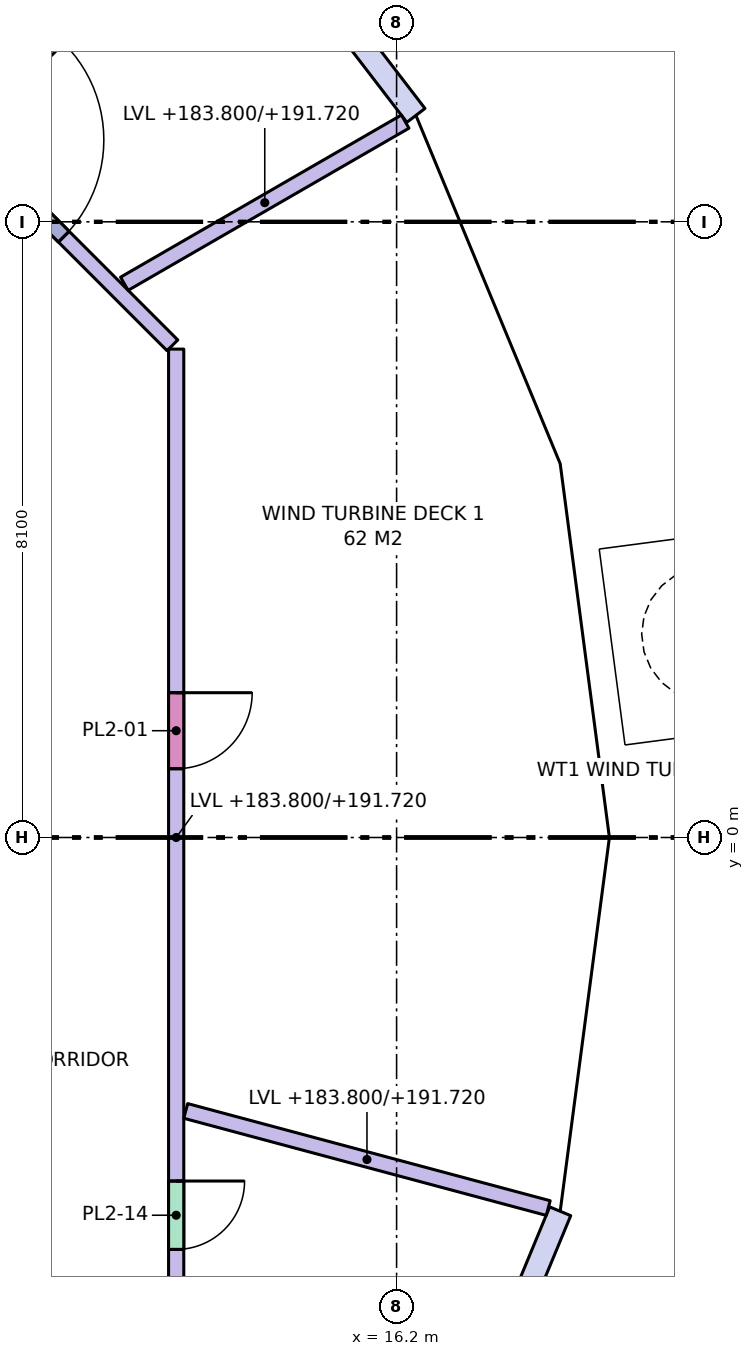
"""IFC4 building model, lengths in metres.
Left out: names, types, materials, properties, quantities, classifications, styles, units other than length and angle.
Written with IfcOpenShell. Run it as: python <this file> out.ifc"""

import sys

from ifc_helpers import new_model, si_unit, direction, frame, frame_2d, origin, place, context, subcontext, project, spatial, rectangle, extrude, element, fill, save


model = new_model("IFC4")
c1 = context("Model", 3, precision=1e-05, world=origin(), true_north=direction((0.0, 1.0)))
c2 = subcontext(c1, "Body", "Model", "MODEL_VIEW")
j1 = project(units=[si_unit("LENGTHUNIT", "METRE"), si_unit("PLANEANGLEUNIT", "RADIAN")], contexts=[c1])
p1 = place(None, origin())
s1 = spatial("IfcSite", under=j1, at=p1, CompositionType="ELEMENT")
p2 = place(p1, origin())
s2 = spatial("IfcBuilding", under=s1, at=p2, CompositionType="ELEMENT")
p3 = place(p2, frame((0.0, 0.0, 183.8)))
s3 = spatial("IfcBuildingStorey", under=s2, at=p3, CompositionType="ELEMENT", Elevation=183.8)
p4 = place(p3, frame((16.455, 9.5, 0.0), z_axis=(0.0, 0.0, 1.0), x_axis=(-0.608786657876, 0.793333980864, 0.0)))
e1 = element("IfcWall", 1, at=p4, inside=s3, PredefinedType="STANDARD", context=c2, shape_type="SweptSolid", body=[
    extrude(rectangle(XDim=4.56, YDim=0.3, at=frame_2d((2.28, 0.0))), origin(), (0.0, 0.0, 1.0), 8.72),
])
p5 = place(p3, frame((16.455, -9.5, 0.0), z_axis=(0.0, 0.0, 1.0), x_axis=(0.382650301762, 0.923893254961, 0.0)))
e2 = element("IfcWall", 2, at=p5, inside=s3, PredefinedType="STANDARD", context=c2, shape_type="SweptSolid", body=[
    extrude(rectangle(XDim=4.96, YDim=0.3, at=frame_2d((2.48, 0.0))), origin(), (0.0, 0.0, 1.0), 8.72),
])
p6 = place(p5, frame((1.98, 0.0, 0.0)))
e3 = element("IfcOpeningElement", 3, at=p6, cuts=e2, PredefinedType="OPENING", context=c2, shape_type="SweptSolid", body=[
    extrude(rectangle(XDim=1.0, YDim=2.4, at=frame_2d((0.5, 1.2))), frame((0.0, 0.16, 0.0), z_axis=(0.0, -1.0, 0.0), x_axis=(1.0, 0.0, 0.0)), (0.0, 0.0, 1.0), 0.32),
])
p7 = place(p3, frame((8.475, 11.25, 0.0), z_axis=(0.0, 0.0, 1.0), x_axis=(0.707106781187, -0.707106781187, 0.0)))
e4 = element("IfcWall", 4, at=p7, inside=s3, PredefinedType="PARTITIONING", context=c2, shape_type="SweptSolid", body=[
    extrude(rectangle(XDim=6.753, YDim=0.2, at=frame_2d((3.377, 0.0))), origin(), (0.0, 0.0, 1.0), 7.92),
])
p8 = place(p7, frame((2.932, 0.0, 0.0)))
e5 = element("IfcOpeningElement", 5, at=p8, cuts=e4, PredefinedType="OPENING", context=c2, shape_type="SweptSolid", body=[
    extrude(rectangle(XDim=1.8, YDim=2.1, at=frame_2d((0.9, 1.05))), frame((0.0, 0.11, 0.0), z_axis=(0.0, -1.0, 0.0), x_axis=(1.0, 0.0, 0.0)), (0.0, 0.0, 1.0), 0.22),
])
p9 = place(p3, frame((13.3, 6.426, 0.0), z_axis=(0.0, 0.0, 1.0), x_axis=(0.0, -1.0, 0.0)))
e6 = element("IfcWall", 6, at=p9, inside=s3, PredefinedType="PARTITIONING", context=c2, shape_type="SweptSolid", body=[
    extrude(rectangle(XDim=12.851, YDim=0.2, at=frame_2d((6.426, 0.0))), origin(), (0.0, 0.0, 1.0), 7.92),
])
p10 = place(p9, frame((4.521, 0.0, 0.0)))
e7 = element("IfcOpeningElement", 7, at=p10, cuts=e6, PredefinedType="OPENING", context=c2, shape_type="SweptSolid", body=[
    extrude(rectangle(XDim=1.0, YDim=2.1, at=frame_2d((0.5, 1.05))), frame((0.0, 0.11, 0.0), z_axis=(0.0, -1.0, 0.0), x_axis=(1.0, 0.0, 0.0)), (0.0, 0.0, 1.0), 0.22),
])
p11 = place(p9, frame((10.945, 0.0, 0.0)))
e8 = element("IfcOpeningElement", 8, at=p11, cuts=e6, PredefinedType="OPENING", context=c2, shape_type="SweptSolid", body=[
    extrude(rectangle(XDim=0.9, YDim=2.1, at=frame_2d((0.45, 1.05))), frame((0.0, 0.11, 0.0), z_axis=(0.0, -1.0, 0.0), x_axis=(1.0, 0.0, 0.0)), (0.0, 0.0, 1.0), 0.22),
])
p12 = place(p3, frame((12.618, 7.285, 0.0), z_axis=(0.0, 0.0, 1.0), x_axis=(0.866005490874, 0.500034488586, 0.0)))
e9 = element("IfcWall", 9, at=p12, inside=s3, PredefinedType="PARTITIONING", context=c2, shape_type="SweptSolid", body=[
    extrude(rectangle(XDim=4.267, YDim=0.2, at=frame_2d((2.133, 0.0))), origin(), (0.0, 0.0, 1.0), 7.92),
])
p13 = place(p3, frame((9.934, 9.934, 0.0), z_axis=(0.0, 0.0, 1.0), x_axis=(0.707106781187, 0.707106781187, 0.0)))
e10 = element("IfcWall", 10, at=p13, inside=s3, PredefinedType="PARTITIONING", context=c2, shape_type="SweptSolid", body=[
    extrude(rectangle(XDim=4.789, YDim=0.2, at=frame_2d((2.394, 0.0))), origin(), (0.0, 0.0, 1.0), 8.72),
])
p14 = place(p3, frame((13.426, -3.597, 0.0), z_axis=(0.0, 0.0, 1.0), x_axis=(0.9659306159, -0.258801169369, 0.0)))
e11 = element("IfcWall", 11, at=p14, inside=s3, PredefinedType="PARTITIONING", context=c2, shape_type="SweptSolid", body=[
    extrude(rectangle(XDim=4.938, YDim=0.2, at=frame_2d((2.469, 0.0))), origin(), (0.0, 0.0, 1.0), 7.92),
])
p15 = place(p10, origin())
e12 = element("IfcDoor", 12, at=p15, inside=s3, OperationType="SINGLE_SWING_LEFT", PredefinedType="DOOR", context=c2, shape_type="SweptSolid", body=[
    extrude(rectangle(XDim=1.0, YDim=2.1, at=frame_2d((0.5, 1.05))), frame((0.0, 0.025, 0.0), z_axis=(0.0, -1.0, 0.0), x_axis=(1.0, 0.0, 0.0)), (0.0, 0.0, 1.0), 0.05),
])
fill(e7, e12)
p16 = place(p8, origin())
e13 = element("IfcDoor", 13, at=p16, inside=s3, OperationType="DOUBLE_DOOR_SINGLE_SWING", PredefinedType="DOOR", context=c2, shape_type="SweptSolid", body=[
    extrude(rectangle(XDim=1.8, YDim=2.1, at=frame_2d((0.9, 1.05))), frame((0.0, 0.025, 0.0), z_axis=(0.0, -1.0, 0.0), x_axis=(1.0, 0.0, 0.0)), (0.0, 0.0, 1.0), 0.05),
])
fill(e5, e13)
p17 = place(p11, origin())
e14 = element("IfcDoor", 14, at=p17, inside=s3, OperationType="SINGLE_SWING_LEFT", PredefinedType="DOOR", context=c2, shape_type="SweptSolid", body=[
    extrude(rectangle(XDim=0.9, YDim=2.1, at=frame_2d((0.45, 1.05))), frame((0.0, 0.025, 0.0), z_axis=(0.0, -1.0, 0.0), x_axis=(1.0, 0.0, 0.0)), (0.0, 0.0, 1.0), 0.05),
])
fill(e8, e14)
save(model, sys.argv[1])
